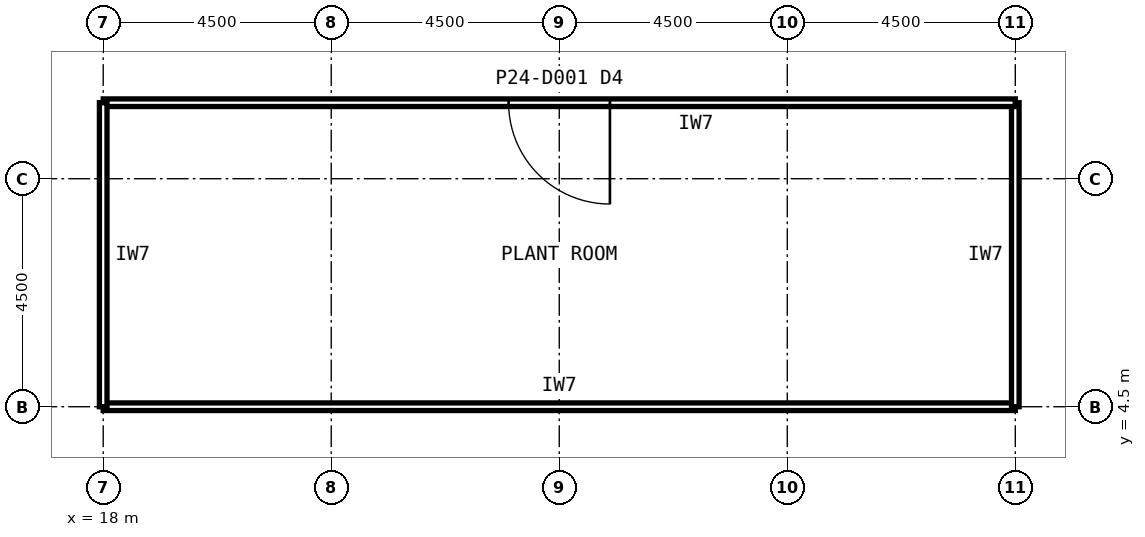
"""IFC4 building model, lengths in metres.
Left out: names, types, materials, properties, quantities, classifications, styles, units other than length and angle.
Written with IfcOpenShell. Run it as: python <this file> out.ifc"""

import sys

from ifc_helpers import new_model, si_unit, direction, frame, frame_2d, origin, place, context, subcontext, project, spatial, rectangle, extrude, element, fill, save


model = new_model("IFC4")
c1 = context("Model", 3, precision=1e-05, world=origin(), true_north=direction((0.0, 1.0)))
c2 = subcontext(c1, "Body", "Model", "MODEL_VIEW")
j1 = project(units=[si_unit("LENGTHUNIT", "METRE"), si_unit("PLANEANGLEUNIT", "RADIAN")], contexts=[c1])
p1 = place(None, origin())
s1 = spatial("IfcSite", under=j1, at=p1, CompositionType="ELEMENT")
p2 = place(p1, origin())
s2 = spatial("IfcBuilding", under=s1, at=p2, CompositionType="ELEMENT")
p3 = place(p2, frame((0.0, 0.0, 104.6)))
s3 = spatial("IfcBuildingStorey", under=s2, at=p3, CompositionType="ELEMENT", Elevation=104.6)
p4 = place(p3, frame((18.0, 4.5, 0.0), z_axis=(0.0, 0.0, 1.0), x_axis=(1.0, 0.0, 0.0)))
e1 = element("IfcWall", 1, at=p4, inside=s3, PredefinedType="PARTITIONING", context=c2, shape_type="SweptSolid", body=[
    extrude(rectangle(XDim=18.0, YDim=0.15, at=frame_2d((9.0, 0.0))), origin(), (0.0, 0.0, 1.0), 5.82),
])
p5 = place(p3, frame((36.0, 4.5, 0.0), z_axis=(0.0, 0.0, 1.0), x_axis=(0.0, 1.0, 0.0)))
e2 = element("IfcWall", 2, at=p5, inside=s3, PredefinedType="PARTITIONING", context=c2, shape_type="SweptSolid", body=[
    extrude(rectangle(XDim=6.0, YDim=0.15, at=frame_2d((3.0, 0.0))), origin(), (0.0, 0.0, 1.0), 4.72),
])
p6 = place(p3, frame((36.0, 10.5, 0.0), z_axis=(0.0, 0.0, 1.0), x_axis=(-1.0, 0.0, 0.0)))
e3 = element("IfcWall", 3, at=p6, inside=s3, PredefinedType="PARTITIONING", context=c2, shape_type="SweptSolid", body=[
    extrude(rectangle(XDim=18.0, YDim=0.15, at=frame_2d((9.0, 0.0))), origin(), (0.0, 0.0, 1.0), 5.82),
])
p7 = place(p6, frame((8.0, 0.0, 0.0)))
e4 = element("IfcOpeningElement", 4, at=p7, cuts=e3, PredefinedType="OPENING", context=c2, shape_type="SweptSolid", body=[
    extrude(rectangle(XDim=2.0, YDim=2.4, at=frame_2d((1.0, 1.2))), frame((0.0, 0.085, 0.0), z_axis=(0.0, -1.0, 0.0), x_axis=(1.0, 0.0, 0.0)), (0.0, 0.0, 1.0), 0.17),
])
p8 = place(p3, frame((18.0, 10.5, 0.0), z_axis=(0.0, 0.0, 1.0), x_axis=(0.0, -1.0, 0.0)))
e5 = element("IfcWall", 5, at=p8, inside=s3, PredefinedType="PARTITIONING", context=c2, shape_type="SweptSolid", body=[
    extrude(rectangle(XDim=6.0, YDim=0.15, at=frame_2d((3.0, 0.0))), origin(), (0.0, 0.0, 1.0), 4.72),
])
p9 = place(p7, origin())
e6 = element("IfcDoor", 6, at=p9, inside=s3, OperationType="SINGLE_SWING_LEFT", PredefinedType="DOOR", context=c2, shape_type="SweptSolid", body=[
    extrude(rectangle(XDim=2.0, YDim=2.4, at=frame_2d((1.0, 1.2))), frame((0.0, 0.025, 0.0), z_axis=(0.0, -1.0, 0.0), x_axis=(1.0, 0.0, 0.0)), (0.0, 0.0, 1.0), 0.05),
])
fill(e4, e6)
save(model, sys.argv[1])
